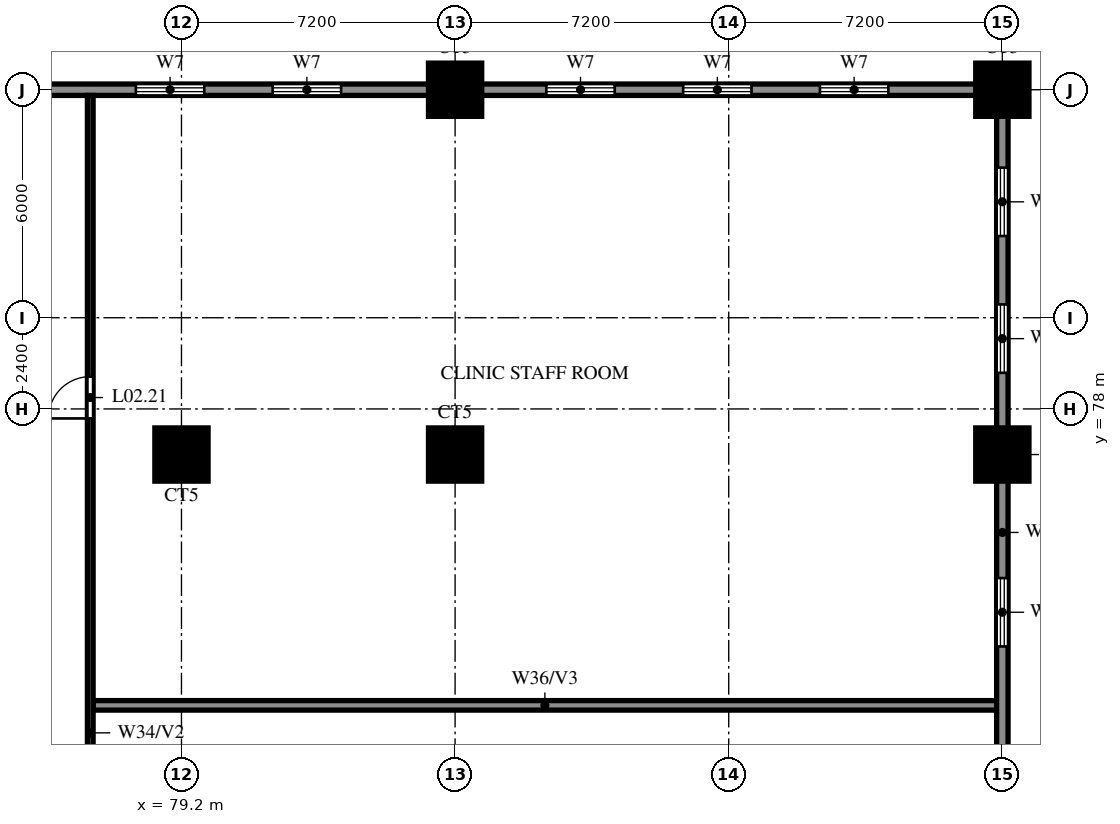
"""IFC4 building model, lengths in metres.
Left out: names, types, materials, properties, quantities, classifications, styles, units other than length and angle.
Written with IfcOpenShell. Run it as: python <this file> out.ifc"""

import sys

from ifc_helpers import new_model, si_unit, direction, frame, frame_2d, origin, origin_2d, place, context, subcontext, project, spatial, rectangle, circle, extrude, source, transform, mapped, element, fill, save


model = new_model("IFC4")
c1 = context("Model", 3, precision=1e-05, world=origin(), true_north=direction((0.0, 1.0)))
c2 = subcontext(c1, "Body", "Model", "MODEL_VIEW")
j1 = project(units=[si_unit("LENGTHUNIT", "METRE"), si_unit("PLANEANGLEUNIT", "RADIAN")], contexts=[c1])
p1 = place(None, origin())
s1 = spatial("IfcSite", under=j1, at=p1, CompositionType="ELEMENT")
p2 = place(p1, origin())
s2 = spatial("IfcBuilding", under=s1, at=p2, CompositionType="ELEMENT")
p3 = place(p2, frame((0.0, 0.0, 13.2)))
s3 = spatial("IfcBuildingStorey", under=s2, at=p3, CompositionType="ELEMENT", Elevation=13.2)
m1 = source(origin(), c2, "Body", "SweptSolid", [
    extrude(circle(Radius=0.7, at=origin_2d()), origin(), (0.0, 0.0, 1.0), 3.8),
])
for number, where, z_axis, x_axis in (
    (1, (79.2, 76.8, 0.0), (0.0, 0.0, 1.0), (1.0, 0.0, 0.0)),
    (2, (86.4, 76.8, 0.0), (0.0, 0.0, 1.0), (1.0, 0.0, 0.0)),
    (3, (100.8, 76.8, 0.0), (0.0, 0.0, 1.0), (1.0, 0.0, 0.0)),
    (4, (86.4, 86.4, 0.0), (0.0, 0.0, 1.0), (1.0, 0.0, 0.0)),
    (5, (100.8, 86.4, 0.0), (0.0, 0.0, 1.0), (1.0, 0.0, 0.0)),
):
    element("IfcColumn", number, at=place(p3, frame(where, z_axis=z_axis, x_axis=x_axis)), inside=s3, PredefinedType="COLUMN", context=c2, shape_type="MappedRepresentation", body=[
        mapped(m1, transform((0.0, 0.0, 0.0))),
    ])
p4 = place(p3, frame((76.875, 70.2, 0.0), z_axis=(0.0, 0.0, 1.0), x_axis=(1.0, 0.0, 0.0)))
e6 = element("IfcWall", 6, at=p4, inside=s3, PredefinedType="SOLIDWALL", context=c2, shape_type="SweptSolid", body=[
    extrude(rectangle(XDim=23.775, YDim=0.25, at=frame_2d((11.887, 0.0))), origin(), (0.0, 0.0, 1.0), 2.6),
])
p5 = place(p3, frame((0.0, 86.4, 0.0), z_axis=(0.0, 0.0, 1.0), x_axis=(1.0, 0.0, 0.0)))
e7 = element("IfcWall", 7, at=p5, inside=s3, PredefinedType="SOLIDWALL", context=c2, shape_type="SweptSolid", body=[
    extrude(rectangle(XDim=100.8, YDim=0.3, at=frame_2d((50.4, 0.0))), origin(), (0.0, 0.0, 1.0), 3.8),
])
p6 = place(p5, frame((2.4, 0.0, 0.6)))
e8 = element("IfcOpeningElement", 8, at=p6, cuts=e7, PredefinedType="OPENING", context=c2, shape_type="SweptSolid", body=[
    extrude(rectangle(XDim=1.8, YDim=2.4, at=frame_2d((0.9, 1.2))), frame((0.0, 0.16, 0.0), z_axis=(0.0, -1.0, 0.0), x_axis=(1.0, 0.0, 0.0)), (0.0, 0.0, 1.0), 0.32),
])
p7 = place(p5, frame((6.0, 0.0, 0.6)))
e9 = element("IfcOpeningElement", 9, at=p7, cuts=e7, PredefinedType="OPENING", context=c2, shape_type="SweptSolid", body=[
    extrude(rectangle(XDim=1.8, YDim=2.4, at=frame_2d((0.9, 1.2))), frame((0.0, 0.16, 0.0), z_axis=(0.0, -1.0, 0.0), x_axis=(1.0, 0.0, 0.0)), (0.0, 0.0, 1.0), 0.32),
])
p8 = place(p5, frame((9.6, 0.0, 0.6)))
e10 = element("IfcOpeningElement", 10, at=p8, cuts=e7, PredefinedType="OPENING", context=c2, shape_type="SweptSolid", body=[
    extrude(rectangle(XDim=1.8, YDim=2.4, at=frame_2d((0.9, 1.2))), frame((0.0, 0.16, 0.0), z_axis=(0.0, -1.0, 0.0), x_axis=(1.0, 0.0, 0.0)), (0.0, 0.0, 1.0), 0.32),
])
p9 = place(p5, frame((16.8, 0.0, 0.6)))
e11 = element("IfcOpeningElement", 11, at=p9, cuts=e7, PredefinedType="OPENING", context=c2, shape_type="SweptSolid", body=[
    extrude(rectangle(XDim=1.8, YDim=2.4, at=frame_2d((0.9, 1.2))), frame((0.0, 0.16, 0.0), z_axis=(0.0, -1.0, 0.0), x_axis=(1.0, 0.0, 0.0)), (0.0, 0.0, 1.0), 0.32),
])
p10 = place(p5, frame((20.4, 0.0, 0.6)))
e12 = element("IfcOpeningElement", 12, at=p10, cuts=e7, PredefinedType="OPENING", context=c2, shape_type="SweptSolid", body=[
    extrude(rectangle(XDim=1.8, YDim=2.4, at=frame_2d((0.9, 1.2))), frame((0.0, 0.16, 0.0), z_axis=(0.0, -1.0, 0.0), x_axis=(1.0, 0.0, 0.0)), (0.0, 0.0, 1.0), 0.32),
])
p11 = place(p5, frame((78.0, 0.0, 0.6)))
e13 = element("IfcOpeningElement", 13, at=p11, cuts=e7, PredefinedType="OPENING", context=c2, shape_type="SweptSolid", body=[
    extrude(rectangle(XDim=1.8, YDim=2.4, at=frame_2d((0.9, 1.2))), frame((0.0, 0.16, 0.0), z_axis=(0.0, -1.0, 0.0), x_axis=(1.0, 0.0, 0.0)), (0.0, 0.0, 1.0), 0.32),
])
p12 = place(p5, frame((81.6, 0.0, 0.6)))
e14 = element("IfcOpeningElement", 14, at=p12, cuts=e7, PredefinedType="OPENING", context=c2, shape_type="SweptSolid", body=[
    extrude(rectangle(XDim=1.8, YDim=2.4, at=frame_2d((0.9, 1.2))), frame((0.0, 0.16, 0.0), z_axis=(0.0, -1.0, 0.0), x_axis=(1.0, 0.0, 0.0)), (0.0, 0.0, 1.0), 0.32),
])
p13 = place(p5, frame((88.8, 0.0, 0.6)))
e15 = element("IfcOpeningElement", 15, at=p13, cuts=e7, PredefinedType="OPENING", context=c2, shape_type="SweptSolid", body=[
    extrude(rectangle(XDim=1.8, YDim=2.4, at=frame_2d((0.9, 1.2))), frame((0.0, 0.16, 0.0), z_axis=(0.0, -1.0, 0.0), x_axis=(1.0, 0.0, 0.0)), (0.0, 0.0, 1.0), 0.32),
])
p14 = place(p5, frame((92.4, 0.0, 0.6)))
e16 = element("IfcOpeningElement", 16, at=p14, cuts=e7, PredefinedType="OPENING", context=c2, shape_type="SweptSolid", body=[
    extrude(rectangle(XDim=1.8, YDim=2.4, at=frame_2d((0.9, 1.2))), frame((0.0, 0.16, 0.0), z_axis=(0.0, -1.0, 0.0), x_axis=(1.0, 0.0, 0.0)), (0.0, 0.0, 1.0), 0.32),
])
p15 = place(p5, frame((96.0, 0.0, 0.6)))
e17 = element("IfcOpeningElement", 17, at=p15, cuts=e7, PredefinedType="OPENING", context=c2, shape_type="SweptSolid", body=[
    extrude(rectangle(XDim=1.8, YDim=2.4, at=frame_2d((0.9, 1.2))), frame((0.0, 0.16, 0.0), z_axis=(0.0, -1.0, 0.0), x_axis=(1.0, 0.0, 0.0)), (0.0, 0.0, 1.0), 0.32),
])
p16 = place(p3, frame((76.8, 54.3, 0.0), z_axis=(0.0, 0.0, 1.0), x_axis=(0.0, 1.0, 0.0)))
e18 = element("IfcWall", 18, at=p16, inside=s3, PredefinedType="PARTITIONING", context=c2, shape_type="SweptSolid", body=[
    extrude(rectangle(XDim=31.95, YDim=0.15, at=frame_2d((15.975, 0.0))), origin(), (0.0, 0.0, 1.0), 2.6),
])
p17 = place(p16, frame((10.65, 0.0, 0.0)))
e19 = element("IfcOpeningElement", 19, at=p17, cuts=e18, PredefinedType="OPENING", context=c2, shape_type="SweptSolid", body=[
    extrude(rectangle(XDim=1.8, YDim=2.1, at=frame_2d((0.9, 1.05))), frame((0.0, 0.085, 0.0), z_axis=(0.0, -1.0, 0.0), x_axis=(1.0, 0.0, 0.0)), (0.0, 0.0, 1.0), 0.17),
])
p18 = place(p16, frame((23.45, 0.0, 0.0)))
e20 = element("IfcOpeningElement", 20, at=p18, cuts=e18, PredefinedType="OPENING", context=c2, shape_type="SweptSolid", body=[
    extrude(rectangle(XDim=1.1, YDim=2.1, at=frame_2d((0.55, 1.05))), frame((0.0, 0.085, 0.0), z_axis=(0.0, -1.0, 0.0), x_axis=(1.0, 0.0, 0.0)), (0.0, 0.0, 1.0), 0.17),
])
p19 = place(p3, frame((100.8, 63.1, 0.0), z_axis=(0.0, 0.0, 1.0), x_axis=(0.0, 1.0, 0.0)))
e21 = element("IfcWall", 21, at=p19, inside=s3, PredefinedType="SOLIDWALL", context=c2, shape_type="SweptSolid", body=[
    extrude(rectangle(XDim=23.3, YDim=0.3, at=frame_2d((11.65, 0.0))), origin(), (0.0, 0.0, 1.0), 3.8),
])
p20 = place(p19, frame((1.45, 0.0, 0.6)))
e22 = element("IfcOpeningElement", 22, at=p20, cuts=e21, PredefinedType="OPENING", context=c2, shape_type="SweptSolid", body=[
    extrude(rectangle(XDim=1.8, YDim=2.4, at=frame_2d((0.9, 1.2))), frame((0.0, 0.16, 0.0), z_axis=(0.0, -1.0, 0.0), x_axis=(1.0, 0.0, 0.0)), (0.0, 0.0, 1.0), 0.32),
])
p21 = place(p19, frame((3.55, 0.0, 0.6)))
e23 = element("IfcOpeningElement", 23, at=p21, cuts=e21, PredefinedType="OPENING", context=c2, shape_type="SweptSolid", body=[
    extrude(rectangle(XDim=1.8, YDim=2.4, at=frame_2d((0.9, 1.2))), frame((0.0, 0.16, 0.0), z_axis=(0.0, -1.0, 0.0), x_axis=(1.0, 0.0, 0.0)), (0.0, 0.0, 1.0), 0.32),
])
p22 = place(p19, frame((8.65, 0.0, 0.6)))
e24 = element("IfcOpeningElement", 24, at=p22, cuts=e21, PredefinedType="OPENING", context=c2, shape_type="SweptSolid", body=[
    extrude(rectangle(XDim=1.8, YDim=2.4, at=frame_2d((0.9, 1.2))), frame((0.0, 0.16, 0.0), z_axis=(0.0, -1.0, 0.0), x_axis=(1.0, 0.0, 0.0)), (0.0, 0.0, 1.0), 0.32),
])
p23 = place(p19, frame((15.85, 0.0, 0.6)))
e25 = element("IfcOpeningElement", 25, at=p23, cuts=e21, PredefinedType="OPENING", context=c2, shape_type="SweptSolid", body=[
    extrude(rectangle(XDim=1.8, YDim=2.4, at=frame_2d((0.9, 1.2))), frame((0.0, 0.16, 0.0), z_axis=(0.0, -1.0, 0.0), x_axis=(1.0, 0.0, 0.0)), (0.0, 0.0, 1.0), 0.32),
])
p24 = place(p19, frame((19.45, 0.0, 0.6)))
e26 = element("IfcOpeningElement", 26, at=p24, cuts=e21, PredefinedType="OPENING", context=c2, shape_type="SweptSolid", body=[
    extrude(rectangle(XDim=1.8, YDim=2.4, at=frame_2d((0.9, 1.2))), frame((0.0, 0.16, 0.0), z_axis=(0.0, -1.0, 0.0), x_axis=(1.0, 0.0, 0.0)), (0.0, 0.0, 1.0), 0.32),
])
p25 = place(p18, origin())
e27 = element("IfcDoor", 27, at=p25, inside=s3, OperationType="SINGLE_SWING_RIGHT", PredefinedType="DOOR", context=c2, shape_type="SweptSolid", body=[
    extrude(rectangle(XDim=1.1, YDim=2.1, at=frame_2d((0.55, 1.05))), frame((0.0, 0.025, 0.0), z_axis=(0.0, -1.0, 0.0), x_axis=(1.0, 0.0, 0.0)), (0.0, 0.0, 1.0), 0.05),
])
fill(e20, e27)
p26 = place(p11, origin())
e28 = element("IfcWindow", 28, at=p26, inside=s3, PartitioningType="DOUBLE_PANEL_VERTICAL", PredefinedType="WINDOW", context=c2, shape_type="SweptSolid", body=[
    extrude(rectangle(XDim=1.8, YDim=2.4, at=frame_2d((0.9, 1.2))), frame((0.0, 0.03, 0.0), z_axis=(0.0, -1.0, 0.0), x_axis=(1.0, 0.0, 0.0)), (0.0, 0.0, 1.0), 0.06),
])
fill(e13, e28)
p27 = place(p12, origin())
e29 = element("IfcWindow", 29, at=p27, inside=s3, PartitioningType="DOUBLE_PANEL_VERTICAL", PredefinedType="WINDOW", context=c2, shape_type="SweptSolid", body=[
    extrude(rectangle(XDim=1.8, YDim=2.4, at=frame_2d((0.9, 1.2))), frame((0.0, 0.03, 0.0), z_axis=(0.0, -1.0, 0.0), x_axis=(1.0, 0.0, 0.0)), (0.0, 0.0, 1.0), 0.06),
])
fill(e14, e29)
p28 = place(p13, origin())
e30 = element("IfcWindow", 30, at=p28, inside=s3, PartitioningType="DOUBLE_PANEL_VERTICAL", PredefinedType="WINDOW", context=c2, shape_type="SweptSolid", body=[
    extrude(rectangle(XDim=1.8, YDim=2.4, at=frame_2d((0.9, 1.2))), frame((0.0, 0.03, 0.0), z_axis=(0.0, -1.0, 0.0), x_axis=(1.0, 0.0, 0.0)), (0.0, 0.0, 1.0), 0.06),
])
fill(e15, e30)
p29 = place(p14, origin())
e31 = element("IfcWindow", 31, at=p29, inside=s3, PartitioningType="DOUBLE_PANEL_VERTICAL", PredefinedType="WINDOW", context=c2, shape_type="SweptSolid", body=[
    extrude(rectangle(XDim=1.8, YDim=2.4, at=frame_2d((0.9, 1.2))), frame((0.0, 0.03, 0.0), z_axis=(0.0, -1.0, 0.0), x_axis=(1.0, 0.0, 0.0)), (0.0, 0.0, 1.0), 0.06),
])
fill(e16, e31)
p30 = place(p15, origin())
e32 = element("IfcWindow", 32, at=p30, inside=s3, PartitioningType="DOUBLE_PANEL_VERTICAL", PredefinedType="WINDOW", context=c2, shape_type="SweptSolid", body=[
    extrude(rectangle(XDim=1.8, YDim=2.4, at=frame_2d((0.9, 1.2))), frame((0.0, 0.03, 0.0), z_axis=(0.0, -1.0, 0.0), x_axis=(1.0, 0.0, 0.0)), (0.0, 0.0, 1.0), 0.06),
])
fill(e17, e32)
p31 = place(p22, origin())
e33 = element("IfcWindow", 33, at=p31, inside=s3, PartitioningType="DOUBLE_PANEL_VERTICAL", PredefinedType="WINDOW", context=c2, shape_type="SweptSolid", body=[
    extrude(rectangle(XDim=1.8, YDim=2.4, at=frame_2d((0.9, 1.2))), frame((0.0, 0.03, 0.0), z_axis=(0.0, -1.0, 0.0), x_axis=(1.0, 0.0, 0.0)), (0.0, 0.0, 1.0), 0.06),
])
fill(e24, e33)
p32 = place(p23, origin())
e34 = element("IfcWindow", 34, at=p32, inside=s3, PartitioningType="DOUBLE_PANEL_VERTICAL", PredefinedType="WINDOW", context=c2, shape_type="SweptSolid", body=[
    extrude(rectangle(XDim=1.8, YDim=2.4, at=frame_2d((0.9, 1.2))), frame((0.0, 0.03, 0.0), z_axis=(0.0, -1.0, 0.0), x_axis=(1.0, 0.0, 0.0)), (0.0, 0.0, 1.0), 0.06),
])
fill(e25, e34)
p33 = place(p24, origin())
e35 = element("IfcWindow", 35, at=p33, inside=s3, PartitioningType="DOUBLE_PANEL_VERTICAL", PredefinedType="WINDOW", context=c2, shape_type="SweptSolid", body=[
    extrude(rectangle(XDim=1.8, YDim=2.4, at=frame_2d((0.9, 1.2))), frame((0.0, 0.03, 0.0), z_axis=(0.0, -1.0, 0.0), x_axis=(1.0, 0.0, 0.0)), (0.0, 0.0, 1.0), 0.06),
])
fill(e26, e35)
save(model, sys.argv[1])
